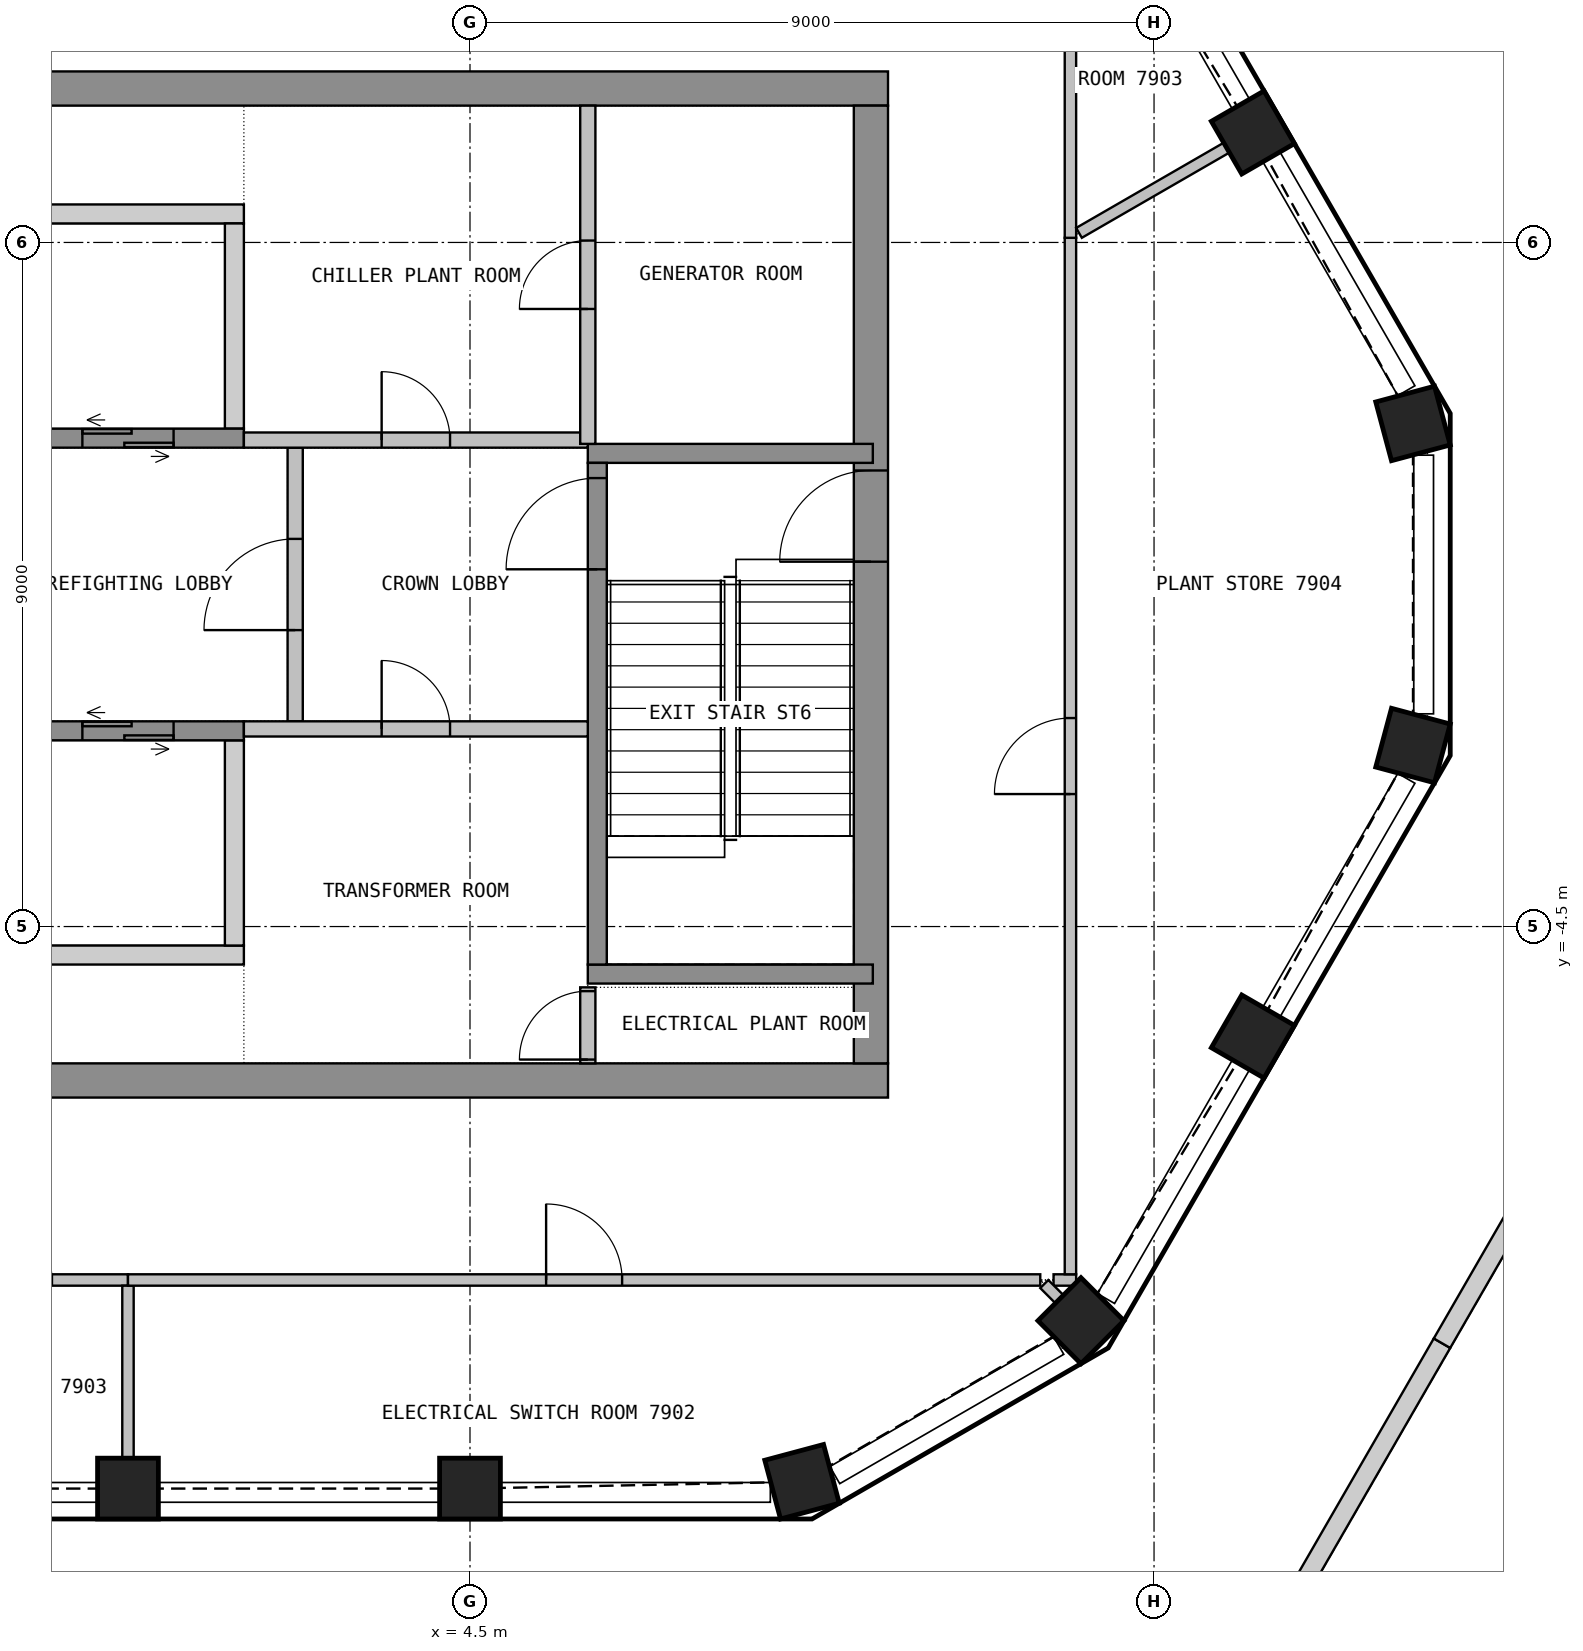
"""IFC4 building model, lengths in metres.
Left out: names, types, materials, properties, quantities, classifications, styles, units other than length and angle.
Written with IfcOpenShell. Run it as: python <this file> out.ifc"""

import sys

from ifc_helpers import new_model, si_unit, direction, frame, frame_2d, origin, origin_2d, place, context, subcontext, project, spatial, polyline, rectangle, outline, extrude, element, fill, save


model = new_model("IFC4")
c1 = context("Model", 3, precision=1e-05, world=origin(), true_north=direction((0.0, 1.0)))
c2 = subcontext(c1, "Body", "Model", "MODEL_VIEW")
j1 = project(units=[si_unit("LENGTHUNIT", "METRE"), si_unit("PLANEANGLEUNIT", "RADIAN")], contexts=[c1])
p1 = place(None, origin())
s1 = spatial("IfcSite", under=j1, at=p1, CompositionType="ELEMENT")
p2 = place(p1, origin())
s2 = spatial("IfcBuilding", under=s1, at=p2, CompositionType="ELEMENT")
p3 = place(p2, frame((0.0, 0.0, 323.4)))
s3 = spatial("IfcBuildingStorey", under=s2, at=p3, CompositionType="ELEMENT", Elevation=323.4)
for number, where, z_axis, x_axis in (
    (1, (0.0, -11.894, 0.0), (0.0, 0.0, 1.0), (1.0, 0.0, 0.0)),
    (2, (4.5, -11.894, 0.0), (0.0, 0.0, 1.0), (1.0, 0.0, 0.0)),
    (3, (8.869, -11.804, 0.0), (0.0, 0.0, 1.0), (0.966, 0.259, 0.0)),
    (4, (12.539, -9.686, 0.0), (0.0, 0.0, 1.0), (0.707, 0.707, 0.0)),
    (5, (14.801, -5.947, 0.0), (0.0, 0.0, 1.0), (0.5, 0.866, 0.0)),
    (6, (16.907, -2.119, 0.0), (0.0, 0.0, 1.0), (0.259, 0.966, 0.0)),
    (7, (16.907, 2.119, 0.0), (0.0, 0.0, 1.0), (-0.259, 0.966, 0.0)),
    (8, (14.801, 5.947, 0.0), (0.0, 0.0, 1.0), (-0.5, 0.866, 0.0)),
):
    element("IfcColumn", number, at=place(p3, frame(where, z_axis=z_axis, x_axis=x_axis)), inside=s3, PredefinedType="COLUMN", context=c2, shape_type="SweptSolid", body=[
        extrude(rectangle(XDim=0.8, YDim=0.8, at=origin_2d()), origin(), (0.0, 0.0, 1.0), 4.05),
    ])
p4 = place(p3, origin())
e9 = element("IfcWall", 9, at=p4, inside=s3, PredefinedType="PARAPET", context=c2, shape_type="SweptSolid", body=[
    extrude(outline(polyline([(15.147, -13.941), (17.397, -10.044), (17.181, -9.919), (14.964, -13.758), (15.147, -13.941)])), origin(), (0.0, 0.0, 1.0), 1.1),
])
p5 = place(p3, origin())
e10 = element("IfcWall", 10, at=p5, inside=s3, PredefinedType="PARAPET", context=c2, shape_type="SweptSolid", body=[
    extrude(outline(polyline([(17.397, -10.044), (19.647, -6.147), (19.431, -6.022), (17.181, -9.919), (17.397, -10.044)])), origin(), (0.0, 0.0, 1.0), 1.1),
])
p6 = place(p3, origin())
e11 = element("IfcWall", 11, at=p6, inside=s3, PredefinedType="PARAPET", context=c2, shape_type="SweptSolid", body=[
    extrude(outline(polyline([(19.647, 6.147), (17.397, 10.044), (17.181, 9.919), (19.431, 6.022), (19.647, 6.147)])), origin(), (0.0, 0.0, 1.0), 1.1),
])
for number, where, z_axis, x_axis in (
    (12, (-10.0, 6.525, 0.0), (0.0, 0.0, 1.0), (1.0, 0.0, 0.0)),
    (13, (-10.0, -6.525, 0.0), (0.0, 0.0, 1.0), (1.0, 0.0, 0.0)),
):
    element("IfcWall", number, at=place(p3, frame(where, z_axis=z_axis, x_axis=x_axis)), inside=s3, PredefinedType="SHEAR", context=c2, shape_type="SweptSolid", body=[
        extrude(rectangle(XDim=20.0, YDim=0.45, at=frame_2d((10.0, 0.0))), origin(), (0.0, 0.0, 1.0), 4.05),
    ])
p7 = place(p3, frame((9.775, -6.3, 0.0), z_axis=(0.0, 0.0, 1.0), x_axis=(0.0, 1.0, 0.0)))
e14 = element("IfcWall", 14, at=p7, inside=s3, PredefinedType="SHEAR", context=c2, shape_type="SweptSolid", body=[
    extrude(rectangle(XDim=12.6, YDim=0.45, at=frame_2d((6.3, 0.0))), origin(), (0.0, 0.0, 1.0), 4.05),
])
p8 = place(p7, frame((6.6, 0.0, 0.0)))
e15 = element("IfcOpeningElement", 15, at=p8, cuts=e14, PredefinedType="OPENING", context=c2, shape_type="SweptSolid", body=[
    extrude(rectangle(XDim=1.2, YDim=2.1, at=frame_2d((0.6, 1.05))), frame((0.0, 0.235, 0.0), z_axis=(0.0, -1.0, 0.0), x_axis=(1.0, 0.0, 0.0)), (0.0, 0.0, 1.0), 0.47),
])
p9 = place(p3, origin())
e16 = element("IfcWall", 16, at=p9, inside=s3, PredefinedType="SHEAR", context=c2, shape_type="SweptSolid", body=[
    extrude(outline(polyline([(-1.525, 4.75), (1.525, 4.75), (1.525, 5.0), (-1.525, 5.0), (-1.525, 4.75)])), origin(), (0.0, 0.0, 1.0), 4.05),
])
p10 = place(p3, origin())
e17 = element("IfcWall", 17, at=p10, inside=s3, PredefinedType="SHEAR", context=c2, shape_type="SweptSolid", body=[
    extrude(outline(polyline([(1.275, 2.05), (1.525, 2.05), (1.525, 4.75), (1.275, 4.75), (1.275, 2.05)])), origin(), (0.0, 0.0, 1.0), 4.05),
])
p11 = place(p3, frame((-1.525, 1.925, 0.0), z_axis=(0.0, 0.0, 1.0), x_axis=(1.0, 0.0, 0.0)))
e18 = element("IfcWall", 18, at=p11, inside=s3, PredefinedType="SHEAR", context=c2, shape_type="SweptSolid", body=[
    extrude(rectangle(XDim=3.05, YDim=0.25, at=frame_2d((1.525, 0.0))), origin(), (0.0, 0.0, 1.0), 4.05),
])
p12 = place(p11, frame((0.925, 0.0, 0.0)))
e19 = element("IfcOpeningElement", 19, at=p12, cuts=e18, PredefinedType="OPENING", context=c2, shape_type="SweptSolid", body=[
    extrude(rectangle(XDim=1.2, YDim=2.1, at=frame_2d((0.6, 1.05))), frame((0.0, 0.135, 0.0), z_axis=(0.0, -1.0, 0.0), x_axis=(1.0, 0.0, 0.0)), (0.0, 0.0, 1.0), 0.27),
])
p13 = place(p3, origin())
e20 = element("IfcWall", 20, at=p13, inside=s3, PredefinedType="SHEAR", context=c2, shape_type="SweptSolid", body=[
    extrude(outline(polyline([(-1.525, -5.0), (1.525, -5.0), (1.525, -4.75), (-1.525, -4.75), (-1.525, -5.0)])), origin(), (0.0, 0.0, 1.0), 4.05),
])
p14 = place(p3, origin())
e21 = element("IfcWall", 21, at=p14, inside=s3, PredefinedType="SHEAR", context=c2, shape_type="SweptSolid", body=[
    extrude(outline(polyline([(1.275, -4.75), (1.525, -4.75), (1.525, -2.05), (1.275, -2.05), (1.275, -4.75)])), origin(), (0.0, 0.0, 1.0), 4.05),
])
p15 = place(p3, frame((-1.525, -1.925, 0.0), z_axis=(0.0, 0.0, 1.0), x_axis=(1.0, 0.0, 0.0)))
e22 = element("IfcWall", 22, at=p15, inside=s3, PredefinedType="SHEAR", context=c2, shape_type="SweptSolid", body=[
    extrude(rectangle(XDim=3.05, YDim=0.25, at=frame_2d((1.525, 0.0))), origin(), (0.0, 0.0, 1.0), 4.05),
])
p16 = place(p15, frame((0.925, 0.0, 0.0)))
e23 = element("IfcOpeningElement", 23, at=p16, cuts=e22, PredefinedType="OPENING", context=c2, shape_type="SweptSolid", body=[
    extrude(rectangle(XDim=1.2, YDim=2.1, at=frame_2d((0.6, 1.05))), frame((0.0, 0.135, 0.0), z_axis=(0.0, -1.0, 0.0), x_axis=(1.0, 0.0, 0.0)), (0.0, 0.0, 1.0), 0.27),
])
p17 = place(p3, frame((2.2, -1.8, 0.0), z_axis=(0.0, 0.0, 1.0), x_axis=(0.0, 1.0, 0.0)))
e24 = element("IfcWall", 24, at=p17, inside=s3, PredefinedType="PARTITIONING", context=c2, shape_type="SweptSolid", body=[
    extrude(rectangle(XDim=3.6, YDim=0.2, at=frame_2d((1.8, 0.0))), origin(), (0.0, 0.0, 1.0), 4.05),
])
p18 = place(p17, frame((1.2, 0.0, 0.0)))
e25 = element("IfcOpeningElement", 25, at=p18, cuts=e24, PredefinedType="OPENING", context=c2, shape_type="SweptSolid", body=[
    extrude(rectangle(XDim=1.2, YDim=2.1, at=frame_2d((0.6, 1.05))), frame((0.0, 0.11, 0.0), z_axis=(0.0, -1.0, 0.0), x_axis=(1.0, 0.0, 0.0)), (0.0, 0.0, 1.0), 0.22),
])
for number, where, z_axis, x_axis in (
    (26, (6.05, -5.125, 0.0), (0.0, 0.0, 1.0), (1.0, 0.0, 0.0)),
    (27, (6.05, 1.725, 0.0), (0.0, 0.0, 1.0), (1.0, 0.0, 0.0)),
):
    element("IfcWall", number, at=place(p3, frame(where, z_axis=z_axis, x_axis=x_axis)), inside=s3, PredefinedType="SHEAR", context=c2, shape_type="SweptSolid", body=[
        extrude(rectangle(XDim=3.75, YDim=0.25, at=frame_2d((1.875, 0.0))), origin(), (0.0, 0.0, 1.0), 4.05),
    ])
p19 = place(p3, frame((6.175, -5.0, 0.0), z_axis=(0.0, 0.0, 1.0), x_axis=(0.0, 1.0, 0.0)))
e28 = element("IfcWall", 28, at=p19, inside=s3, PredefinedType="SHEAR", context=c2, shape_type="SweptSolid", body=[
    extrude(rectangle(XDim=6.6, YDim=0.25, at=frame_2d((3.3, 0.0))), origin(), (0.0, 0.0, 1.0), 4.05),
])
p20 = place(p19, frame((5.2, 0.0, 0.0)))
e29 = element("IfcOpeningElement", 29, at=p20, cuts=e28, PredefinedType="OPENING", context=c2, shape_type="SweptSolid", body=[
    extrude(rectangle(XDim=1.2, YDim=2.1, at=frame_2d((0.6, 1.05))), frame((0.0, 0.135, 0.0), z_axis=(0.0, -1.0, 0.0), x_axis=(1.0, 0.0, 0.0)), (0.0, 0.0, 1.0), 0.27),
])
p21 = place(p3, frame((1.525, 1.9, 0.0), z_axis=(0.0, 0.0, 1.0), x_axis=(1.0, 0.0, 0.0)))
e30 = element("IfcWall", 30, at=p21, inside=s3, PredefinedType="PARTITIONING", context=c2, shape_type="SweptSolid", body=[
    extrude(rectangle(XDim=4.525, YDim=0.2, at=frame_2d((2.263, 0.0))), origin(), (0.0, 0.0, 1.0), 4.05),
])
p22 = place(p21, frame((1.812, 0.0, 0.0)))
e31 = element("IfcOpeningElement", 31, at=p22, cuts=e30, PredefinedType="OPENING", context=c2, shape_type="SweptSolid", body=[
    extrude(rectangle(XDim=0.9, YDim=2.1, at=frame_2d((0.45, 1.05))), frame((0.0, 0.11, 0.0), z_axis=(0.0, -1.0, 0.0), x_axis=(1.0, 0.0, 0.0)), (0.0, 0.0, 1.0), 0.22),
])
p23 = place(p3, frame((1.525, -1.9, 0.0), z_axis=(0.0, 0.0, 1.0), x_axis=(1.0, 0.0, 0.0)))
e32 = element("IfcWall", 32, at=p23, inside=s3, PredefinedType="PARTITIONING", context=c2, shape_type="SweptSolid", body=[
    extrude(rectangle(XDim=4.525, YDim=0.2, at=frame_2d((2.263, 0.0))), origin(), (0.0, 0.0, 1.0), 4.05),
])
p24 = place(p23, frame((1.812, 0.0, 0.0)))
e33 = element("IfcOpeningElement", 33, at=p24, cuts=e32, PredefinedType="OPENING", context=c2, shape_type="SweptSolid", body=[
    extrude(rectangle(XDim=0.9, YDim=2.1, at=frame_2d((0.45, 1.05))), frame((0.0, 0.11, 0.0), z_axis=(0.0, -1.0, 0.0), x_axis=(1.0, 0.0, 0.0)), (0.0, 0.0, 1.0), 0.22),
])
p25 = place(p3, frame((6.05, 1.85, 0.0), z_axis=(0.0, 0.0, 1.0), x_axis=(0.0, 1.0, 0.0)))
e34 = element("IfcWall", 34, at=p25, inside=s3, PredefinedType="PARTITIONING", context=c2, shape_type="SweptSolid", body=[
    extrude(rectangle(XDim=4.45, YDim=0.2, at=frame_2d((2.225, 0.0))), origin(), (0.0, 0.0, 1.0), 4.05),
])
p26 = place(p25, frame((1.775, 0.0, 0.0)))
e35 = element("IfcOpeningElement", 35, at=p26, cuts=e34, PredefinedType="OPENING", context=c2, shape_type="SweptSolid", body=[
    extrude(rectangle(XDim=0.9, YDim=2.1, at=frame_2d((0.45, 1.05))), frame((0.0, 0.11, 0.0), z_axis=(0.0, -1.0, 0.0), x_axis=(1.0, 0.0, 0.0)), (0.0, 0.0, 1.0), 0.22),
])
p27 = place(p3, frame((6.05, -6.3, 0.0), z_axis=(0.0, 0.0, 1.0), x_axis=(0.0, 1.0, 0.0)))
e36 = element("IfcWall", 36, at=p27, inside=s3, PredefinedType="PARTITIONING", context=c2, shape_type="SweptSolid", body=[
    extrude(rectangle(XDim=1.0, YDim=0.2, at=frame_2d((0.5, 0.0))), origin(), (0.0, 0.0, 1.0), 4.05),
])
p28 = place(p27, frame((0.05, 0.0, 0.0)))
e37 = element("IfcOpeningElement", 37, at=p28, cuts=e36, PredefinedType="OPENING", context=c2, shape_type="SweptSolid", body=[
    extrude(rectangle(XDim=0.9, YDim=2.1, at=frame_2d((0.45, 1.05))), frame((0.0, 0.11, 0.0), z_axis=(0.0, -1.0, 0.0), x_axis=(1.0, 0.0, 0.0)), (0.0, 0.0, 1.0), 0.22),
])
p29 = place(p3, frame((-3.0, -9.15, 0.0), z_axis=(0.0, 0.0, 1.0), x_axis=(1.0, 0.0, 0.0)))
e38 = element("IfcWall", 38, at=p29, inside=s3, PredefinedType="PARTITIONING", context=c2, shape_type="SweptSolid", body=[
    extrude(rectangle(XDim=3.0, YDim=0.15, at=frame_2d((1.5, 0.0))), origin(), (0.0, 0.0, 1.0), 4.05),
])
p30 = place(p29, frame((1.0, 0.0, 0.0)))
e39 = element("IfcOpeningElement", 39, at=p30, cuts=e38, PredefinedType="OPENING", context=c2, shape_type="SweptSolid", body=[
    extrude(rectangle(XDim=1.0, YDim=2.1, at=frame_2d((0.5, 1.05))), frame((0.0, 0.085, 0.0), z_axis=(0.0, -1.0, 0.0), x_axis=(1.0, 0.0, 0.0)), (0.0, 0.0, 1.0), 0.17),
])
p31 = place(p3, frame((0.0, -9.225, 0.0), z_axis=(0.0, 0.0, 1.0), x_axis=(0.0, -1.0, 0.0)))
e40 = element("IfcWall", 40, at=p31, inside=s3, PredefinedType="PARTITIONING", context=c2, shape_type="SweptSolid", body=[
    extrude(rectangle(XDim=2.769, YDim=0.15, at=frame_2d((1.384, 0.0))), origin(), (0.0, 0.0, 1.0), 4.05),
])
p32 = place(p3, frame((0.0, -9.15, 0.0), z_axis=(0.0, 0.0, 1.0), x_axis=(1.0, 0.0, 0.0)))
e41 = element("IfcWall", 41, at=p32, inside=s3, PredefinedType="PARTITIONING", context=c2, shape_type="SweptSolid", body=[
    extrude(rectangle(XDim=12.003, YDim=0.15, at=frame_2d((6.001, 0.0))), origin(), (0.0, 0.0, 1.0), 4.05),
])
p33 = place(p32, frame((5.501, 0.0, 0.0)))
e42 = element("IfcOpeningElement", 42, at=p33, cuts=e41, PredefinedType="OPENING", context=c2, shape_type="SweptSolid", body=[
    extrude(rectangle(XDim=1.0, YDim=2.1, at=frame_2d((0.5, 1.05))), frame((0.0, 0.085, 0.0), z_axis=(0.0, -1.0, 0.0), x_axis=(1.0, 0.0, 0.0)), (0.0, 0.0, 1.0), 0.17),
])
p34 = place(p3, frame((12.178, -9.15, 0.0), z_axis=(0.0, 0.0, 1.0), x_axis=(1.0, 0.0, 0.0)))
e43 = element("IfcWall", 43, at=p34, inside=s3, PredefinedType="PARTITIONING", context=c2, shape_type="SweptSolid", body=[
    extrude(rectangle(XDim=0.297, YDim=0.15, at=frame_2d((0.148, 0.0))), origin(), (0.0, 0.0, 1.0), 4.05),
])
p35 = place(p3, frame((12.056, -9.203, 0.0), z_axis=(0.0, 0.0, 1.0), x_axis=(0.706689978005, -0.707523338828, 0.0)))
e44 = element("IfcWall", 44, at=p35, inside=s3, PredefinedType="PARTITIONING", context=c2, shape_type="SweptSolid", body=[
    extrude(rectangle(XDim=0.879, YDim=0.15, at=frame_2d((0.439, 0.0))), origin(), (0.0, 0.0, 1.0), 4.05),
])
p36 = place(p3, frame((12.4, -9.075, 0.0), z_axis=(0.0, 0.0, 1.0), x_axis=(0.0, 1.0, 0.0)))
e45 = element("IfcWall", 45, at=p36, inside=s3, PredefinedType="PARTITIONING", context=c2, shape_type="SweptSolid", body=[
    extrude(rectangle(XDim=13.636, YDim=0.15, at=frame_2d((6.818, 0.0))), origin(), (0.0, 0.0, 1.0), 4.05),
])
p37 = place(p36, frame((6.318, 0.0, 0.0)))
e46 = element("IfcOpeningElement", 46, at=p37, cuts=e45, PredefinedType="OPENING", context=c2, shape_type="SweptSolid", body=[
    extrude(rectangle(XDim=1.0, YDim=2.1, at=frame_2d((0.5, 1.05))), frame((0.0, 0.085, 0.0), z_axis=(0.0, -1.0, 0.0), x_axis=(1.0, 0.0, 0.0)), (0.0, 0.0, 1.0), 0.17),
])
p38 = place(p3, frame((12.4, 4.561, 0.0), z_axis=(0.0, 0.0, 1.0), x_axis=(0.0, 1.0, 0.0)))
e47 = element("IfcWall", 47, at=p38, inside=s3, PredefinedType="PARTITIONING", context=c2, shape_type="SweptSolid", body=[
    extrude(rectangle(XDim=4.514, YDim=0.15, at=frame_2d((2.257, 0.0))), origin(), (0.0, 0.0, 1.0), 4.05),
])
p39 = place(p3, frame((14.887, 5.997, 0.0), z_axis=(0.0, 0.0, 1.0), x_axis=(-0.865976483427, -0.500084722974, 0.0)))
e48 = element("IfcWall", 48, at=p39, inside=s3, PredefinedType="PARTITIONING", context=c2, shape_type="SweptSolid", body=[
    extrude(rectangle(XDim=2.742, YDim=0.15, at=frame_2d((1.371, 0.0))), origin(), (0.0, 0.0, 1.0), 4.05),
])
p40 = place(p8, origin())
e49 = element("IfcDoor", 49, at=p40, inside=s3, OperationType="SINGLE_SWING_RIGHT", PredefinedType="DOOR", context=c2, shape_type="SweptSolid", body=[
    extrude(rectangle(XDim=1.2, YDim=2.1, at=frame_2d((0.6, 1.05))), frame((0.0, 0.025, 0.0), z_axis=(0.0, -1.0, 0.0), x_axis=(1.0, 0.0, 0.0)), (0.0, 0.0, 1.0), 0.05),
])
fill(e15, e49)
p41 = place(p12, origin())
e50 = element("IfcDoor", 50, at=p41, inside=s3, OperationType="DOUBLE_DOOR_SLIDING", PredefinedType="DOOR", context=c2, shape_type="SweptSolid", body=[
    extrude(rectangle(XDim=1.2, YDim=2.1, at=frame_2d((0.6, 1.05))), frame((0.0, 0.025, 0.0), z_axis=(0.0, -1.0, 0.0), x_axis=(1.0, 0.0, 0.0)), (0.0, 0.0, 1.0), 0.05),
])
fill(e19, e50)
p42 = place(p16, origin())
e51 = element("IfcDoor", 51, at=p42, inside=s3, OperationType="DOUBLE_DOOR_SLIDING", PredefinedType="DOOR", context=c2, shape_type="SweptSolid", body=[
    extrude(rectangle(XDim=1.2, YDim=2.1, at=frame_2d((0.6, 1.05))), frame((0.0, 0.025, 0.0), z_axis=(0.0, -1.0, 0.0), x_axis=(1.0, 0.0, 0.0)), (0.0, 0.0, 1.0), 0.05),
])
fill(e23, e51)
p43 = place(p18, origin())
e52 = element("IfcDoor", 52, at=p43, inside=s3, OperationType="SINGLE_SWING_LEFT", PredefinedType="DOOR", context=c2, shape_type="SweptSolid", body=[
    extrude(rectangle(XDim=1.2, YDim=2.1, at=frame_2d((0.6, 1.05))), frame((0.0, 0.025, 0.0), z_axis=(0.0, -1.0, 0.0), x_axis=(1.0, 0.0, 0.0)), (0.0, 0.0, 1.0), 0.05),
])
fill(e25, e52)
p44 = place(p20, origin())
e53 = element("IfcDoor", 53, at=p44, inside=s3, OperationType="SINGLE_SWING_LEFT", PredefinedType="DOOR", context=c2, shape_type="SweptSolid", body=[
    extrude(rectangle(XDim=1.2, YDim=2.1, at=frame_2d((0.6, 1.05))), frame((0.0, 0.025, 0.0), z_axis=(0.0, -1.0, 0.0), x_axis=(1.0, 0.0, 0.0)), (0.0, 0.0, 1.0), 0.05),
])
fill(e29, e53)
p45 = place(p22, origin())
e54 = element("IfcDoor", 54, at=p45, inside=s3, OperationType="SINGLE_SWING_LEFT", PredefinedType="DOOR", context=c2, shape_type="SweptSolid", body=[
    extrude(rectangle(XDim=0.9, YDim=2.1, at=frame_2d((0.45, 1.05))), frame((0.0, 0.025, 0.0), z_axis=(0.0, -1.0, 0.0), x_axis=(1.0, 0.0, 0.0)), (0.0, 0.0, 1.0), 0.05),
])
fill(e31, e54)
p46 = place(p24, origin())
e55 = element("IfcDoor", 55, at=p46, inside=s3, OperationType="SINGLE_SWING_LEFT", PredefinedType="DOOR", context=c2, shape_type="SweptSolid", body=[
    extrude(rectangle(XDim=0.9, YDim=2.1, at=frame_2d((0.45, 1.05))), frame((0.0, 0.025, 0.0), z_axis=(0.0, -1.0, 0.0), x_axis=(1.0, 0.0, 0.0)), (0.0, 0.0, 1.0), 0.05),
])
fill(e33, e55)
p47 = place(p26, origin())
e56 = element("IfcDoor", 56, at=p47, inside=s3, OperationType="SINGLE_SWING_LEFT", PredefinedType="DOOR", context=c2, shape_type="SweptSolid", body=[
    extrude(rectangle(XDim=0.9, YDim=2.1, at=frame_2d((0.45, 1.05))), frame((0.0, 0.025, 0.0), z_axis=(0.0, -1.0, 0.0), x_axis=(1.0, 0.0, 0.0)), (0.0, 0.0, 1.0), 0.05),
])
fill(e35, e56)
p48 = place(p28, origin())
e57 = element("IfcDoor", 57, at=p48, inside=s3, OperationType="SINGLE_SWING_LEFT", PredefinedType="DOOR", context=c2, shape_type="SweptSolid", body=[
    extrude(rectangle(XDim=0.9, YDim=2.1, at=frame_2d((0.45, 1.05))), frame((0.0, 0.025, 0.0), z_axis=(0.0, -1.0, 0.0), x_axis=(1.0, 0.0, 0.0)), (0.0, 0.0, 1.0), 0.05),
])
fill(e37, e57)
p49 = place(p33, origin())
e58 = element("IfcDoor", 58, at=p49, inside=s3, OperationType="SINGLE_SWING_LEFT", PredefinedType="DOOR", context=c2, shape_type="SweptSolid", body=[
    extrude(rectangle(XDim=1.0, YDim=2.1, at=frame_2d((0.5, 1.05))), frame((0.0, 0.025, 0.0), z_axis=(0.0, -1.0, 0.0), x_axis=(1.0, 0.0, 0.0)), (0.0, 0.0, 1.0), 0.05),
])
fill(e42, e58)
p50 = place(p37, origin())
e59 = element("IfcDoor", 59, at=p50, inside=s3, OperationType="SINGLE_SWING_LEFT", PredefinedType="DOOR", context=c2, shape_type="SweptSolid", body=[
    extrude(rectangle(XDim=1.0, YDim=2.1, at=frame_2d((0.5, 1.05))), frame((0.0, 0.025, 0.0), z_axis=(0.0, -1.0, 0.0), x_axis=(1.0, 0.0, 0.0)), (0.0, 0.0, 1.0), 0.05),
])
fill(e46, e59)
save(model, sys.argv[1])
